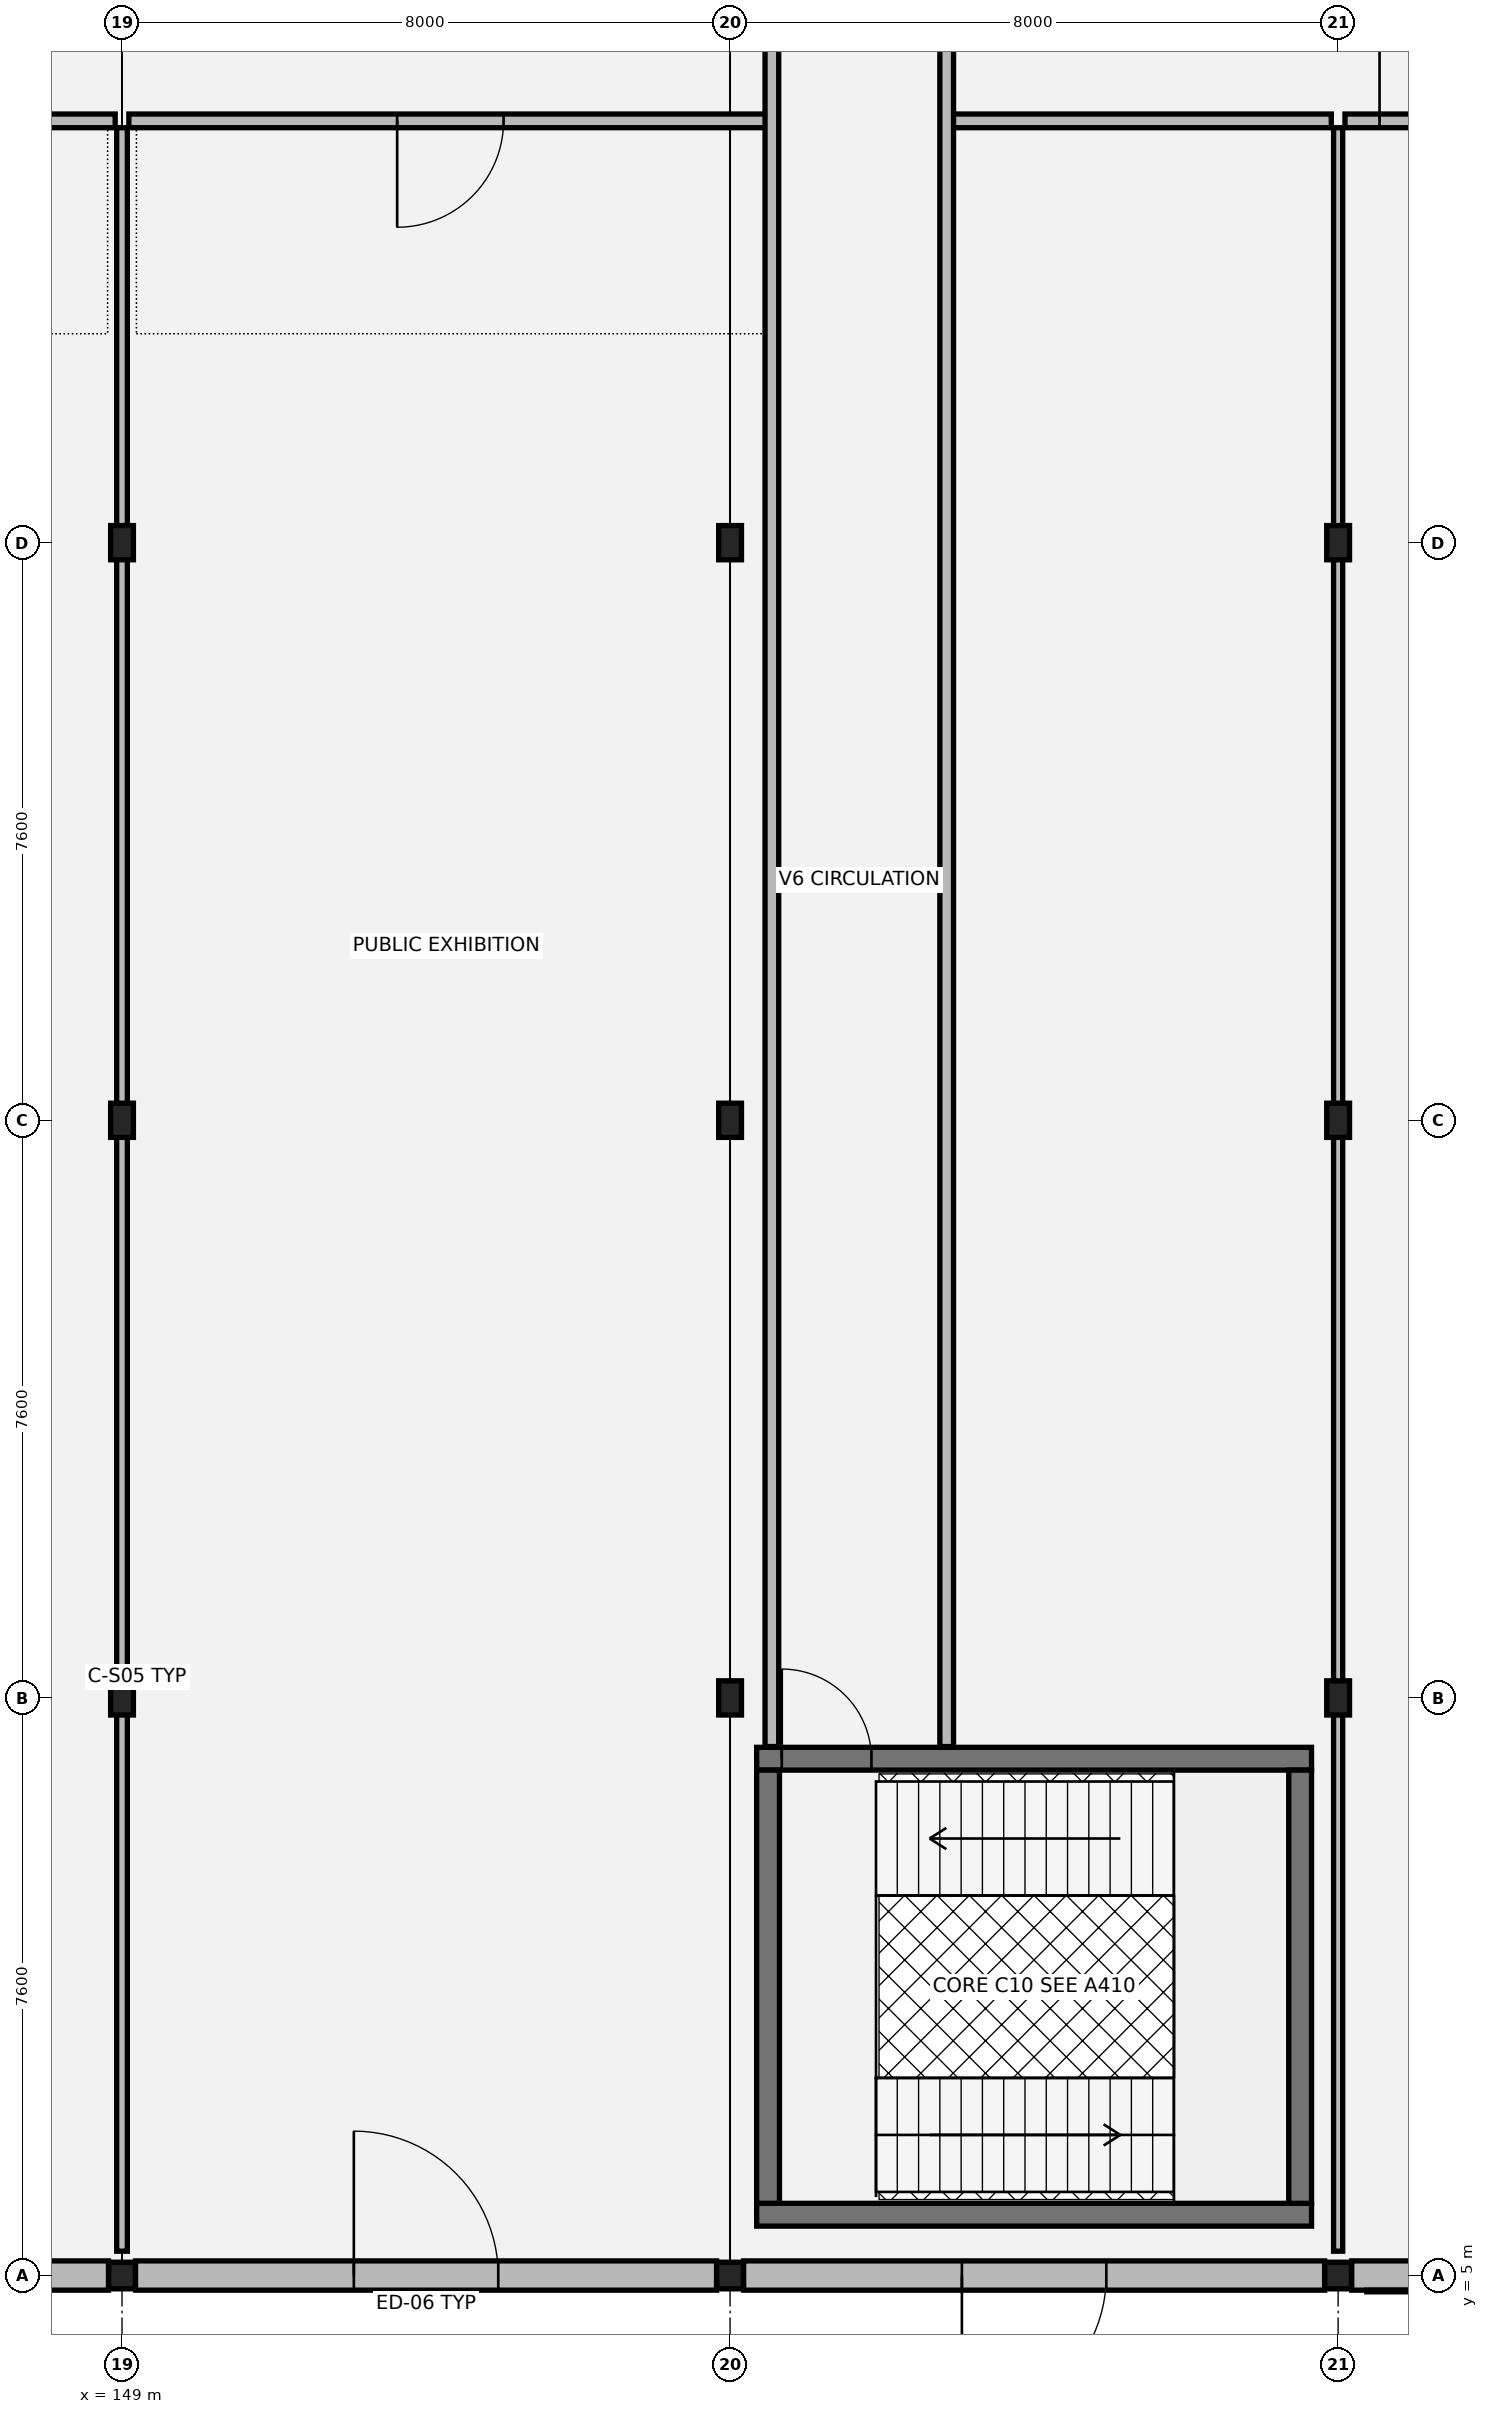
"""IFC4 building model, lengths in metres.
Left out: names, types, materials, properties, quantities, classifications, styles, units other than length and angle.
Written with IfcOpenShell. Run it as: python <this file> out.ifc"""

import sys

from ifc_helpers import new_model, si_unit, direction, frame, frame_2d, origin, origin_2d, place, context, subcontext, project, spatial, rectangle, hollow_rectangle, i_section, extrude, element, fill, save


model = new_model("IFC4")
c1 = context("Model", 3, precision=1e-05, world=origin(), true_north=direction((0.0, 1.0)))
c2 = subcontext(c1, "Body", "Model", "MODEL_VIEW")
j1 = project(units=[si_unit("LENGTHUNIT", "METRE"), si_unit("PLANEANGLEUNIT", "RADIAN")], contexts=[c1])
p1 = place(None, origin())
s1 = spatial("IfcSite", under=j1, at=p1, CompositionType="ELEMENT")
p2 = place(p1, origin())
s2 = spatial("IfcBuilding", under=s1, at=p2, CompositionType="ELEMENT")
p3 = place(p2, origin())
s3 = spatial("IfcBuildingStorey", under=s2, at=p3, CompositionType="ELEMENT", Elevation=0.0)
p4 = place(p3, frame((149.0, 5.0, 0.0), z_axis=(0.0, 0.0, 1.0), x_axis=(1.0, 0.0, 0.0)))
e1 = element("IfcColumn", 1, at=p4, inside=s3, PredefinedType="COLUMN", context=c2, shape_type="SweptSolid", body=[
    extrude(hollow_rectangle(XDim=0.35, YDim=0.35, WallThickness=0.014, at=origin_2d()), origin(), (0.0, 0.0, 1.0), 5.075),
])
for number, where, z_axis, x_axis in (
    (2, (149.0, 12.6, 0.0), (0.0, 0.0, 1.0), (1.0, 0.0, 0.0)),
    (3, (149.0, 20.2, 0.0), (0.0, 0.0, 1.0), (1.0, 0.0, 0.0)),
    (4, (149.0, 27.8, 0.0), (0.0, 0.0, 1.0), (1.0, 0.0, 0.0)),
):
    element("IfcColumn", number, at=place(p3, frame(where, z_axis=z_axis, x_axis=x_axis)), inside=s3, PredefinedType="COLUMN", context=c2, shape_type="SweptSolid", body=[
        extrude(i_section(OverallWidth=0.3, OverallDepth=0.45, WebThickness=0.014, FlangeThickness=0.026, at=origin_2d()), origin(), (0.0, 0.0, 1.0), 5.075),
    ])
p5 = place(p3, frame((157.0, 5.0, 0.0), z_axis=(0.0, 0.0, 1.0), x_axis=(1.0, 0.0, 0.0)))
e5 = element("IfcColumn", 5, at=p5, inside=s3, PredefinedType="COLUMN", context=c2, shape_type="SweptSolid", body=[
    extrude(hollow_rectangle(XDim=0.35, YDim=0.35, WallThickness=0.014, at=origin_2d()), origin(), (0.0, 0.0, 1.0), 5.075),
])
for number, where, z_axis, x_axis in (
    (6, (157.0, 12.6, 0.0), (0.0, 0.0, 1.0), (1.0, 0.0, 0.0)),
    (7, (157.0, 20.2, 0.0), (0.0, 0.0, 1.0), (1.0, 0.0, 0.0)),
    (8, (157.0, 27.8, 0.0), (0.0, 0.0, 1.0), (1.0, 0.0, 0.0)),
):
    element("IfcColumn", number, at=place(p3, frame(where, z_axis=z_axis, x_axis=x_axis)), inside=s3, PredefinedType="COLUMN", context=c2, shape_type="SweptSolid", body=[
        extrude(i_section(OverallWidth=0.3, OverallDepth=0.45, WebThickness=0.014, FlangeThickness=0.026, at=origin_2d()), origin(), (0.0, 0.0, 1.0), 5.075),
    ])
p6 = place(p3, frame((165.0, 5.0, 0.0), z_axis=(0.0, 0.0, 1.0), x_axis=(1.0, 0.0, 0.0)))
e9 = element("IfcColumn", 9, at=p6, inside=s3, PredefinedType="COLUMN", context=c2, shape_type="SweptSolid", body=[
    extrude(hollow_rectangle(XDim=0.35, YDim=0.35, WallThickness=0.014, at=origin_2d()), origin(), (0.0, 0.0, 1.0), 5.075),
])
for number, where, z_axis, x_axis in (
    (10, (165.0, 12.6, 0.0), (0.0, 0.0, 1.0), (1.0, 0.0, 0.0)),
    (11, (165.0, 20.2, 0.0), (0.0, 0.0, 1.0), (1.0, 0.0, 0.0)),
    (12, (165.0, 27.8, 0.0), (0.0, 0.0, 1.0), (1.0, 0.0, 0.0)),
):
    element("IfcColumn", number, at=place(p3, frame(where, z_axis=z_axis, x_axis=x_axis)), inside=s3, PredefinedType="COLUMN", context=c2, shape_type="SweptSolid", body=[
        extrude(i_section(OverallWidth=0.3, OverallDepth=0.45, WebThickness=0.014, FlangeThickness=0.026, at=origin_2d()), origin(), (0.0, 0.0, 1.0), 5.075),
    ])
p7 = place(p3, frame((141.178, 5.0, 0.0), z_axis=(0.0, 0.0, 1.0), x_axis=(1.0, 0.0, 0.0)))
e13 = element("IfcWall", 13, at=p7, inside=s3, PredefinedType="SOLIDWALL", context=c2, shape_type="SweptSolid", body=[
    extrude(rectangle(XDim=7.644, YDim=0.385, at=frame_2d((3.822, 0.0))), origin(), (0.0, 0.0, 1.0), 4.5),
])
p8 = place(p7, frame((2.922, 0.0, 0.0)))
e14 = element("IfcOpeningElement", 14, at=p8, cuts=e13, PredefinedType="OPENING", context=c2, shape_type="SweptSolid", body=[
    extrude(rectangle(XDim=1.8, YDim=2.4, at=frame_2d((0.9, 1.2))), frame((0.0, 0.202, 0.0), z_axis=(0.0, -1.0, 0.0), x_axis=(1.0, 0.0, 0.0)), (0.0, 0.0, 1.0), 0.405),
])
p9 = place(p3, frame((149.178, 5.0, 0.0), z_axis=(0.0, 0.0, 1.0), x_axis=(1.0, 0.0, 0.0)))
e15 = element("IfcWall", 15, at=p9, inside=s3, PredefinedType="SOLIDWALL", context=c2, shape_type="SweptSolid", body=[
    extrude(rectangle(XDim=7.644, YDim=0.385, at=frame_2d((3.822, 0.0))), origin(), (0.0, 0.0, 1.0), 4.5),
])
p10 = place(p9, frame((2.872, 0.0, 0.0)))
e16 = element("IfcOpeningElement", 16, at=p10, cuts=e15, PredefinedType="OPENING", context=c2, shape_type="SweptSolid", body=[
    extrude(rectangle(XDim=1.9, YDim=2.42, at=frame_2d((0.95, 1.21))), frame((0.0, 0.202, 0.0), z_axis=(0.0, -1.0, 0.0), x_axis=(1.0, 0.0, 0.0)), (0.0, 0.0, 1.0), 0.405),
])
p11 = place(p3, frame((157.178, 5.0, 0.0), z_axis=(0.0, 0.0, 1.0), x_axis=(1.0, 0.0, 0.0)))
e17 = element("IfcWall", 17, at=p11, inside=s3, PredefinedType="SOLIDWALL", context=c2, shape_type="SweptSolid", body=[
    extrude(rectangle(XDim=7.644, YDim=0.385, at=frame_2d((3.822, 0.0))), origin(), (0.0, 0.0, 1.0), 4.5),
])
p12 = place(p11, frame((2.872, 0.0, 0.0)))
e18 = element("IfcOpeningElement", 18, at=p12, cuts=e17, PredefinedType="OPENING", context=c2, shape_type="SweptSolid", body=[
    extrude(rectangle(XDim=1.9, YDim=2.42, at=frame_2d((0.95, 1.21))), frame((0.0, 0.202, 0.0), z_axis=(0.0, -1.0, 0.0), x_axis=(1.0, 0.0, 0.0)), (0.0, 0.0, 1.0), 0.405),
])
p13 = place(p3, frame((165.178, 5.0, 0.0), z_axis=(0.0, 0.0, 1.0), x_axis=(1.0, 0.0, 0.0)))
e19 = element("IfcWall", 19, at=p13, inside=s3, PredefinedType="SOLIDWALL", context=c2, shape_type="SweptSolid", body=[
    extrude(rectangle(XDim=7.644, YDim=0.385, at=frame_2d((3.822, 0.0))), origin(), (0.0, 0.0, 1.0), 4.5),
])
p14 = place(p13, frame((0.997, 0.0, 0.8)))
e20 = element("IfcOpeningElement", 20, at=p14, cuts=e19, PredefinedType="OPENING", context=c2, shape_type="SweptSolid", body=[
    extrude(rectangle(XDim=2.5, YDim=2.85, at=frame_2d((1.25, 1.425))), frame((0.0, 0.202, 0.0), z_axis=(0.0, -1.0, 0.0), x_axis=(1.0, 0.0, 0.0)), (0.0, 0.0, 1.0), 0.405),
])
p15 = place(p13, frame((4.147, 0.0, 0.8)))
e21 = element("IfcOpeningElement", 21, at=p15, cuts=e19, PredefinedType="OPENING", context=c2, shape_type="SweptSolid", body=[
    extrude(rectangle(XDim=2.5, YDim=2.85, at=frame_2d((1.25, 1.425))), frame((0.0, 0.202, 0.0), z_axis=(0.0, -1.0, 0.0), x_axis=(1.0, 0.0, 0.0)), (0.0, 0.0, 1.0), 0.405),
])
p16 = place(p3, frame((157.35, 5.8, 0.0), z_axis=(0.0, 0.0, 1.0), x_axis=(1.0, 0.0, 0.0)))
e22 = element("IfcWall", 22, at=p16, inside=s3, PredefinedType="SHEAR", context=c2, shape_type="SweptSolid", body=[
    extrude(rectangle(XDim=7.3, YDim=0.3, at=frame_2d((3.65, 0.0))), origin(), (0.0, 0.0, 1.0), 4.865),
])
p17 = place(p3, frame((157.35, 11.8, 0.0), z_axis=(0.0, 0.0, 1.0), x_axis=(1.0, 0.0, 0.0)))
e23 = element("IfcWall", 23, at=p17, inside=s3, PredefinedType="SHEAR", context=c2, shape_type="SweptSolid", body=[
    extrude(rectangle(XDim=7.3, YDim=0.3, at=frame_2d((3.65, 0.0))), origin(), (0.0, 0.0, 1.0), 4.865),
])
p18 = place(p17, frame((0.33, 0.0, 0.0)))
e24 = element("IfcOpeningElement", 24, at=p18, cuts=e23, PredefinedType="OPENING", context=c2, shape_type="SweptSolid", body=[
    extrude(rectangle(XDim=1.18, YDim=2.18, at=frame_2d((0.59, 1.09))), frame((0.0, 0.16, 0.0), z_axis=(0.0, -1.0, 0.0), x_axis=(1.0, 0.0, 0.0)), (0.0, 0.0, 1.0), 0.32),
])
for number, where, z_axis, x_axis in (
    (25, (157.5, 5.95, 0.0), (0.0, 0.0, 1.0), (0.0, 1.0, 0.0)),
    (26, (164.5, 5.95, 0.0), (0.0, 0.0, 1.0), (0.0, 1.0, 0.0)),
):
    element("IfcWall", number, at=place(p3, frame(where, z_axis=z_axis, x_axis=x_axis)), inside=s3, PredefinedType="SHEAR", context=c2, shape_type="SweptSolid", body=[
        extrude(rectangle(XDim=5.7, YDim=0.3, at=frame_2d((2.85, 0.0))), origin(), (0.0, 0.0, 1.0), 4.865),
    ])
p19 = place(p3, frame((141.2, 33.35, 0.0), z_axis=(0.0, 0.0, 1.0), x_axis=(1.0, 0.0, 0.0)))
e27 = element("IfcWall", 27, at=p19, inside=s3, PredefinedType="PARTITIONING", context=c2, shape_type="SweptSolid", body=[
    extrude(rectangle(XDim=7.71, YDim=0.18, at=frame_2d((3.855, 0.0))), origin(), (0.0, 0.0, 1.0), 4.2),
])
p20 = place(p19, frame((3.055, 0.0, 0.0)))
e28 = element("IfcOpeningElement", 28, at=p20, cuts=e27, PredefinedType="OPENING", context=c2, shape_type="SweptSolid", body=[
    extrude(rectangle(XDim=1.6, YDim=2.25, at=frame_2d((0.8, 1.125))), frame((0.0, 0.1, 0.0), z_axis=(0.0, -1.0, 0.0), x_axis=(1.0, 0.0, 0.0)), (0.0, 0.0, 1.0), 0.2),
])
p21 = place(p3, frame((149.09, 33.35, 0.0), z_axis=(0.0, 0.0, 1.0), x_axis=(1.0, 0.0, 0.0)))
e29 = element("IfcWall", 29, at=p21, inside=s3, PredefinedType="PARTITIONING", context=c2, shape_type="SweptSolid", body=[
    extrude(rectangle(XDim=8.46, YDim=0.18, at=frame_2d((4.23, 0.0))), origin(), (0.0, 0.0, 1.0), 4.2),
])
p22 = place(p21, frame((3.53, 0.0, 0.0)))
e30 = element("IfcOpeningElement", 30, at=p22, cuts=e29, PredefinedType="OPENING", context=c2, shape_type="SweptSolid", body=[
    extrude(rectangle(XDim=1.4, YDim=2.22, at=frame_2d((0.7, 1.11))), frame((0.0, 0.1, 0.0), z_axis=(0.0, -1.0, 0.0), x_axis=(1.0, 0.0, 0.0)), (0.0, 0.0, 1.0), 0.2),
])
p23 = place(p3, frame((159.85, 33.35, 0.0), z_axis=(0.0, 0.0, 1.0), x_axis=(1.0, 0.0, 0.0)))
e31 = element("IfcWall", 31, at=p23, inside=s3, PredefinedType="PARTITIONING", context=c2, shape_type="SweptSolid", body=[
    extrude(rectangle(XDim=5.06, YDim=0.18, at=frame_2d((2.53, 0.0))), origin(), (0.0, 0.0, 1.0), 4.2),
])
p24 = place(p3, frame((165.09, 33.35, 0.0), z_axis=(0.0, 0.0, 1.0), x_axis=(1.0, 0.0, 0.0)))
e32 = element("IfcWall", 32, at=p24, inside=s3, PredefinedType="PARTITIONING", context=c2, shape_type="SweptSolid", body=[
    extrude(rectangle(XDim=2.17, YDim=0.18, at=frame_2d((1.085, 0.0))), origin(), (0.0, 0.0, 1.0), 4.2),
])
p25 = place(p24, frame((0.455, 0.0, 0.0)))
e33 = element("IfcOpeningElement", 33, at=p25, cuts=e32, PredefinedType="OPENING", context=c2, shape_type="SweptSolid", body=[
    extrude(rectangle(XDim=1.26, YDim=2.2, at=frame_2d((0.63, 1.1))), frame((0.0, 0.1, 0.0), z_axis=(0.0, -1.0, 0.0), x_axis=(1.0, 0.0, 0.0)), (0.0, 0.0, 1.0), 0.2),
])
for number, where, z_axis, x_axis in (
    (34, (157.55, 11.96, 0.0), (0.0, 0.0, 1.0), (0.0, 1.0, 0.0)),
    (35, (159.85, 11.96, 0.0), (0.0, 0.0, 1.0), (0.0, 1.0, 0.0)),
):
    element("IfcWall", number, at=place(p3, frame(where, z_axis=z_axis, x_axis=x_axis)), inside=s3, PredefinedType="PARTITIONING", context=c2, shape_type="SweptSolid", body=[
        extrude(rectangle(XDim=24.08, YDim=0.18, at=frame_2d((12.04, 0.0))), origin(), (0.0, 0.0, 1.0), 4.2),
    ])
p26 = place(p3, frame((149.0, 5.32, 0.0), z_axis=(0.0, 0.0, 1.0), x_axis=(0.0, 1.0, 0.0)))
e36 = element("IfcWall", 36, at=p26, inside=s3, PredefinedType="PARTITIONING", context=c2, shape_type="SweptSolid", body=[
    extrude(rectangle(XDim=27.94, YDim=0.14, at=frame_2d((13.97, 0.0))), origin(), (0.0, 0.0, 1.0), 4.2),
])
p27 = place(p3, frame((165.0, 5.32, 0.0), z_axis=(0.0, 0.0, 1.0), x_axis=(0.0, 1.0, 0.0)))
e37 = element("IfcWall", 37, at=p27, inside=s3, PredefinedType="PARTITIONING", context=c2, shape_type="SweptSolid", body=[
    extrude(rectangle(XDim=27.94, YDim=0.12, at=frame_2d((13.97, 0.0))), origin(), (0.0, 0.0, 1.0), 4.2),
])
p28 = place(p10, origin())
e38 = element("IfcDoor", 38, at=p28, inside=s3, OperationType="SINGLE_SWING_LEFT", PredefinedType="DOOR", context=c2, shape_type="SweptSolid", body=[
    extrude(rectangle(XDim=1.9, YDim=2.42, at=frame_2d((0.95, 1.21))), frame((0.0, 0.025, 0.0), z_axis=(0.0, -1.0, 0.0), x_axis=(1.0, 0.0, 0.0)), (0.0, 0.0, 1.0), 0.05),
])
fill(e16, e38)
p29 = place(p12, origin())
e39 = element("IfcDoor", 39, at=p29, inside=s3, OperationType="SINGLE_SWING_RIGHT", PredefinedType="DOOR", context=c2, shape_type="SweptSolid", body=[
    extrude(rectangle(XDim=1.9, YDim=2.42, at=frame_2d((0.95, 1.21))), frame((0.0, 0.025, 0.0), z_axis=(0.0, -1.0, 0.0), x_axis=(1.0, 0.0, 0.0)), (0.0, 0.0, 1.0), 0.05),
])
fill(e18, e39)
p30 = place(p18, origin())
e40 = element("IfcDoor", 40, at=p30, inside=s3, OperationType="SINGLE_SWING_LEFT", PredefinedType="DOOR", context=c2, shape_type="SweptSolid", body=[
    extrude(rectangle(XDim=1.18, YDim=2.18, at=frame_2d((0.59, 1.09))), frame((0.0, 0.025, 0.0), z_axis=(0.0, -1.0, 0.0), x_axis=(1.0, 0.0, 0.0)), (0.0, 0.0, 1.0), 0.05),
])
fill(e24, e40)
p31 = place(p22, origin())
e41 = element("IfcDoor", 41, at=p31, inside=s3, OperationType="SINGLE_SWING_RIGHT", PredefinedType="DOOR", context=c2, shape_type="SweptSolid", body=[
    extrude(rectangle(XDim=1.4, YDim=2.22, at=frame_2d((0.7, 1.11))), frame((0.0, 0.025, 0.0), z_axis=(0.0, -1.0, 0.0), x_axis=(1.0, 0.0, 0.0)), (0.0, 0.0, 1.0), 0.05),
])
fill(e30, e41)
p32 = place(p25, origin())
e42 = element("IfcDoor", 42, at=p32, inside=s3, OperationType="SINGLE_SWING_LEFT", PredefinedType="DOOR", context=c2, shape_type="SweptSolid", body=[
    extrude(rectangle(XDim=1.26, YDim=2.2, at=frame_2d((0.63, 1.1))), frame((0.0, 0.025, 0.0), z_axis=(0.0, -1.0, 0.0), x_axis=(1.0, 0.0, 0.0)), (0.0, 0.0, 1.0), 0.05),
])
fill(e33, e42)
save(model, sys.argv[1])
